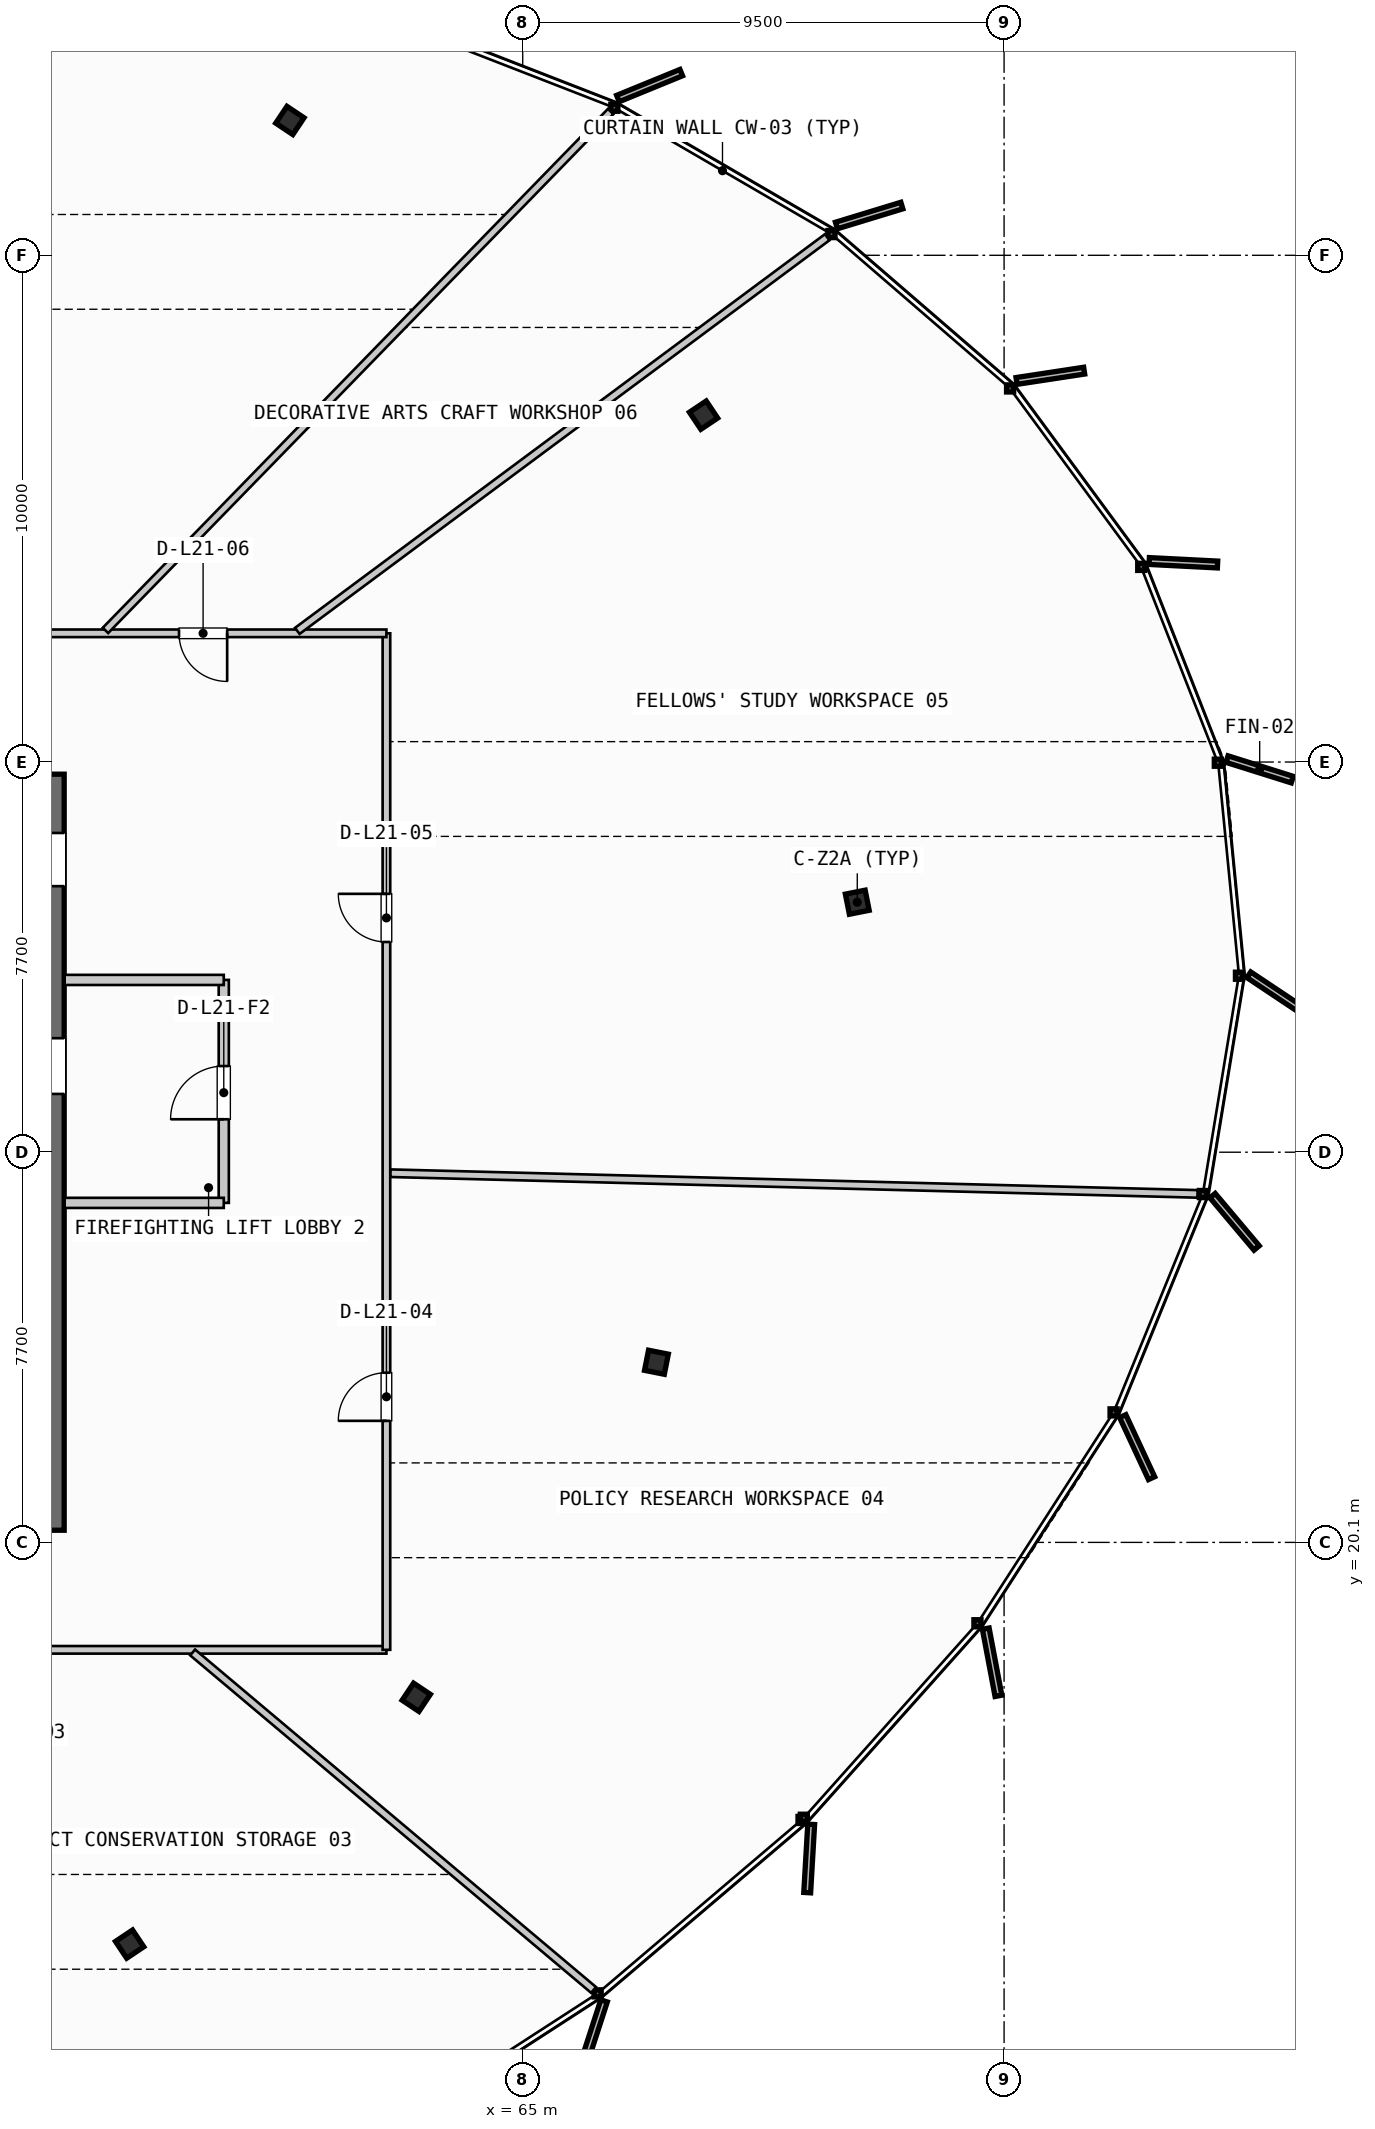
"""IFC4 building model, lengths in metres.
Left out: names, types, materials, properties, quantities, classifications, styles, units other than length and angle.
Written with IfcOpenShell. Run it as: python <this file> out.ifc"""

import sys

from ifc_helpers import new_model, si_unit, direction, frame, frame_2d, origin, origin_2d, place, context, subcontext, project, spatial, rectangle, i_section, extrude, source, transform, mapped, element, fill, save


model = new_model("IFC4")
c1 = context("Model", 3, precision=1e-05, world=origin(), true_north=direction((0.0, 1.0)))
c2 = subcontext(c1, "Body", "Model", "MODEL_VIEW")
j1 = project(units=[si_unit("LENGTHUNIT", "METRE"), si_unit("PLANEANGLEUNIT", "RADIAN")], contexts=[c1])
p1 = place(None, origin())
s1 = spatial("IfcSite", under=j1, at=p1, CompositionType="ELEMENT")
p2 = place(p1, origin())
s2 = spatial("IfcBuilding", under=s1, at=p2, CompositionType="ELEMENT")
p3 = place(p2, frame((0.0, 0.0, 89.2)))
s3 = spatial("IfcBuildingStorey", under=s2, at=p3, CompositionType="ELEMENT", Elevation=89.2)
p4 = place(p3, frame((55.6, 20.34, 0.0), z_axis=(0.0, 0.0, 1.0), x_axis=(0.0, 1.0, 0.0)))
e1 = element("IfcWall", 1, at=p4, inside=s3, PredefinedType="SHEAR", context=c2, shape_type="SweptSolid", body=[
    extrude(rectangle(XDim=14.92, YDim=0.7, at=frame_2d((7.46, 0.0))), origin(), (0.0, 0.0, 1.0), 3.35),
])
p5 = place(p4, frame((12.71, 0.0, 0.0)))
e2 = element("IfcOpeningElement", 2, at=p5, cuts=e1, PredefinedType="OPENING", context=c2, shape_type="SweptSolid", body=[
    extrude(rectangle(XDim=1.05, YDim=2.15, at=frame_2d((0.525, 1.075))), frame((0.0, 0.36, 0.0), z_axis=(0.0, -1.0, 0.0), x_axis=(1.0, 0.0, 0.0)), (0.0, 0.0, 1.0), 0.72),
])
p6 = place(p4, frame((8.61, 0.0, 0.0)))
e3 = element("IfcOpeningElement", 3, at=p6, cuts=e1, PredefinedType="OPENING", context=c2, shape_type="SweptSolid", body=[
    extrude(rectangle(XDim=1.1, YDim=2.2, at=frame_2d((0.55, 1.1))), frame((0.0, 0.36, 0.0), z_axis=(0.0, -1.0, 0.0), x_axis=(1.0, 0.0, 0.0)), (0.0, 0.0, 1.0), 0.72),
])
m1 = source(origin(), c2, "Body", "SweptSolid", [
    extrude(i_section(OverallWidth=0.405, OverallDepth=0.398, WebThickness=0.035, FlangeThickness=0.056, FilletRadius=0.015, at=origin_2d()), origin(), (0.0, 0.0, 1.0), 3.35),
])
for number, where, z_axis, x_axis in (
    (4, (71.603, 32.733, 0.0), (0.0, 0.0, 1.0), (0.981, 0.195, 0.0)),
    (5, (68.569, 42.345, 0.0), (0.0, 0.0, 1.0), (0.831, 0.556, 0.0)),
    (6, (60.405, 48.161, 0.0), (0.0, 0.0, 1.0), (0.556, 0.831, 0.0)),
    (7, (57.242, 12.172, 0.0), (0.0, 0.0, 1.0), (0.556, -0.831, 0.0)),
    (8, (62.899, 17.043, 0.0), (0.0, 0.0, 1.0), (0.831, -0.556, 0.0)),
    (9, (67.639, 23.655, 0.0), (0.0, 0.0, 1.0), (0.981, -0.195, 0.0)),
):
    element("IfcColumn", number, at=place(p3, frame(where, z_axis=z_axis, x_axis=x_axis)), inside=s3, PredefinedType="COLUMN", context=c2, shape_type="MappedRepresentation", body=[
        mapped(m1, transform((0.0, 0.0, 0.0), scale=1.0)),
    ])
p7 = place(p3, frame((59.1, 26.8, 0.0), z_axis=(0.0, 0.0, 1.0), x_axis=(0.0, 1.0, 0.0)))
e10 = element("IfcWall", 10, at=p7, inside=s3, PredefinedType="PARTITIONING", context=c2, shape_type="SweptSolid", body=[
    extrude(rectangle(XDim=4.4, YDim=0.2, at=frame_2d((2.2, 0.0))), origin(), (0.0, 0.0, 1.0), 2.28),
])
p8 = place(p7, frame((1.65, 0.0, 0.0)))
e11 = element("IfcOpeningElement", 11, at=p8, cuts=e10, PredefinedType="OPENING", context=c2, shape_type="SweptSolid", body=[
    extrude(rectangle(XDim=1.05, YDim=2.15, at=frame_2d((0.525, 1.075))), frame((0.0, 0.11, 0.0), z_axis=(0.0, -1.0, 0.0), x_axis=(1.0, 0.0, 0.0)), (0.0, 0.0, 1.0), 0.22),
])
for number, where, z_axis, x_axis in (
    (12, (55.96, 26.8, 0.0), (0.0, 0.0, 1.0), (1.0, 0.0, 0.0)),
    (13, (55.96, 31.2, 0.0), (0.0, 0.0, 1.0), (1.0, 0.0, 0.0)),
):
    element("IfcWall", number, at=place(p3, frame(where, z_axis=z_axis, x_axis=x_axis)), inside=s3, PredefinedType="PARTITIONING", context=c2, shape_type="SweptSolid", body=[
        extrude(rectangle(XDim=3.14, YDim=0.2, at=frame_2d((1.57, 0.0))), origin(), (0.0, 0.0, 1.0), 2.28),
    ])
p9 = place(p3, frame((30.77, 17.98, 0.0), z_axis=(0.0, 0.0, 1.0), x_axis=(1.0, 0.0, 0.0)))
e14 = element("IfcWall", 14, at=p9, inside=s3, PredefinedType="PARTITIONING", context=c2, shape_type="SweptSolid", body=[
    extrude(rectangle(XDim=31.54, YDim=0.15, at=frame_2d((15.77, 0.0))), origin(), (0.0, 0.0, 1.0), 2.28),
])
p10 = place(p9, frame((5.88, 0.0, 0.0)))
e15 = element("IfcOpeningElement", 15, at=p10, cuts=e14, PredefinedType="OPENING", context=c2, shape_type="SweptSolid", body=[
    extrude(rectangle(XDim=0.95, YDim=2.15, at=frame_2d((0.475, 1.075))), frame((0.0, 0.085, 0.0), z_axis=(0.0, -1.0, 0.0), x_axis=(1.0, 0.0, 0.0)), (0.0, 0.0, 1.0), 0.17),
])
p11 = place(p9, frame((15.978, 0.0, 0.0)))
e16 = element("IfcOpeningElement", 16, at=p11, cuts=e14, PredefinedType="OPENING", context=c2, shape_type="SweptSolid", body=[
    extrude(rectangle(XDim=0.95, YDim=2.15, at=frame_2d((0.475, 1.075))), frame((0.0, 0.085, 0.0), z_axis=(0.0, -1.0, 0.0), x_axis=(1.0, 0.0, 0.0)), (0.0, 0.0, 1.0), 0.17),
])
p12 = place(p9, frame((23.812, 0.0, 0.0)))
e17 = element("IfcOpeningElement", 17, at=p12, cuts=e14, PredefinedType="OPENING", context=c2, shape_type="SweptSolid", body=[
    extrude(rectangle(XDim=0.95, YDim=2.15, at=frame_2d((0.475, 1.075))), frame((0.0, 0.085, 0.0), z_axis=(0.0, -1.0, 0.0), x_axis=(1.0, 0.0, 0.0)), (0.0, 0.0, 1.0), 0.17),
])
p13 = place(p3, frame((62.31, 17.98, 0.0), z_axis=(0.0, 0.0, 1.0), x_axis=(0.0, 1.0, 0.0)))
e18 = element("IfcWall", 18, at=p13, inside=s3, PredefinedType="PARTITIONING", context=c2, shape_type="SweptSolid", body=[
    extrude(rectangle(XDim=20.06, YDim=0.15, at=frame_2d((10.03, 0.0))), origin(), (0.0, 0.0, 1.0), 2.28),
])
p14 = place(p13, frame((4.519, 0.0, 0.0)))
e19 = element("IfcOpeningElement", 19, at=p14, cuts=e18, PredefinedType="OPENING", context=c2, shape_type="SweptSolid", body=[
    extrude(rectangle(XDim=0.95, YDim=2.15, at=frame_2d((0.475, 1.075))), frame((0.0, 0.085, 0.0), z_axis=(0.0, -1.0, 0.0), x_axis=(1.0, 0.0, 0.0)), (0.0, 0.0, 1.0), 0.17),
])
p15 = place(p13, frame((13.969, 0.0, 0.0)))
e20 = element("IfcOpeningElement", 20, at=p15, cuts=e18, PredefinedType="OPENING", context=c2, shape_type="SweptSolid", body=[
    extrude(rectangle(XDim=0.95, YDim=2.15, at=frame_2d((0.475, 1.075))), frame((0.0, 0.085, 0.0), z_axis=(0.0, -1.0, 0.0), x_axis=(1.0, 0.0, 0.0)), (0.0, 0.0, 1.0), 0.17),
])
p16 = place(p3, frame((62.31, 38.04, 0.0), z_axis=(0.0, 0.0, 1.0), x_axis=(-1.0, 0.0, 0.0)))
e21 = element("IfcWall", 21, at=p16, inside=s3, PredefinedType="PARTITIONING", context=c2, shape_type="SweptSolid", body=[
    extrude(rectangle(XDim=31.54, YDim=0.15, at=frame_2d((15.77, 0.0))), origin(), (0.0, 0.0, 1.0), 2.28),
])
p17 = place(p16, frame((3.143, 0.0, 0.0)))
e22 = element("IfcOpeningElement", 22, at=p17, cuts=e21, PredefinedType="OPENING", context=c2, shape_type="SweptSolid", body=[
    extrude(rectangle(XDim=0.95, YDim=2.15, at=frame_2d((0.475, 1.075))), frame((0.0, 0.085, 0.0), z_axis=(0.0, -1.0, 0.0), x_axis=(1.0, 0.0, 0.0)), (0.0, 0.0, 1.0), 0.17),
])
p18 = place(p16, frame((12.512, 0.0, 0.0)))
e23 = element("IfcOpeningElement", 23, at=p18, cuts=e21, PredefinedType="OPENING", context=c2, shape_type="SweptSolid", body=[
    extrude(rectangle(XDim=0.95, YDim=2.15, at=frame_2d((0.475, 1.075))), frame((0.0, 0.085, 0.0), z_axis=(0.0, -1.0, 0.0), x_axis=(1.0, 0.0, 0.0)), (0.0, 0.0, 1.0), 0.17),
])
p19 = place(p16, frame((25.231, 0.0, 0.0)))
e24 = element("IfcOpeningElement", 24, at=p19, cuts=e21, PredefinedType="OPENING", context=c2, shape_type="SweptSolid", body=[
    extrude(rectangle(XDim=0.95, YDim=2.15, at=frame_2d((0.475, 1.075))), frame((0.0, 0.085, 0.0), z_axis=(0.0, -1.0, 0.0), x_axis=(1.0, 0.0, 0.0)), (0.0, 0.0, 1.0), 0.17),
])
p20 = place(p3, frame((51.57, 17.908, 0.0), z_axis=(0.0, 0.0, 1.0), x_axis=(0.434373756615, -0.900732723711, 0.0)))
e25 = element("IfcWall", 25, at=p20, inside=s3, PredefinedType="PARTITIONING", context=c2, shape_type="SweptSolid", body=[
    extrude(rectangle(XDim=13.045, YDim=0.15, at=frame_2d((6.522, 0.0))), origin(), (0.0, 0.0, 1.0), 2.28),
])
p21 = place(p3, frame((58.485, 17.928, 0.0), z_axis=(0.0, 0.0, 1.0), x_axis=(0.765056250886, -0.643963456247, 0.0)))
e26 = element("IfcWall", 26, at=p21, inside=s3, PredefinedType="PARTITIONING", context=c2, shape_type="SweptSolid", body=[
    extrude(rectangle(XDim=10.343, YDim=0.15, at=frame_2d((5.171, 0.0))), origin(), (0.0, 0.0, 1.0), 2.28),
])
p22 = place(p3, frame((62.39, 27.385, 0.0), z_axis=(0.0, 0.0, 1.0), x_axis=(0.999671742938, -0.025620428796, 0.0)))
e27 = element("IfcWall", 27, at=p22, inside=s3, PredefinedType="PARTITIONING", context=c2, shape_type="SweptSolid", body=[
    extrude(rectangle(XDim=15.933, YDim=0.15, at=frame_2d((7.966, 0.0))), origin(), (0.0, 0.0, 1.0), 2.28),
])
p23 = place(p3, frame((60.551, 38.088, 0.0), z_axis=(0.0, 0.0, 1.0), x_axis=(0.802739746864, 0.596329521997, 0.0)))
e28 = element("IfcWall", 28, at=p23, inside=s3, PredefinedType="PARTITIONING", context=c2, shape_type="SweptSolid", body=[
    extrude(rectangle(XDim=13.027, YDim=0.15, at=frame_2d((6.514, 0.0))), origin(), (0.0, 0.0, 1.0), 2.28),
])
p24 = place(p3, frame((56.765, 38.097, 0.0), z_axis=(0.0, 0.0, 1.0), x_axis=(0.697622683168, 0.716465345938, 0.0)))
e29 = element("IfcWall", 29, at=p24, inside=s3, PredefinedType="PARTITIONING", context=c2, shape_type="SweptSolid", body=[
    extrude(rectangle(XDim=14.291, YDim=0.15, at=frame_2d((7.146, 0.0))), origin(), (0.0, 0.0, 1.0), 2.28),
])
m2 = source(origin(), c2, "Body", "SweptSolid", [
    extrude(rectangle(XDim=1.05, YDim=2.15, at=frame_2d((0.525, 1.075))), frame((0.0, 0.025, 0.0), z_axis=(0.0, -1.0, 0.0), x_axis=(1.0, 0.0, 0.0)), (0.0, 0.0, 1.0), 0.05),
])
p25 = place(p8, origin())
e30 = element("IfcDoor", 30, at=p25, inside=s3, OperationType="SINGLE_SWING_LEFT", PredefinedType="DOOR", context=c2, shape_type="MappedRepresentation", body=[
    mapped(m2, transform((0.0, 0.0, 0.0), scale=1.0)),
])
fill(e11, e30)
m3 = source(origin(), c2, "Body", "SweptSolid", [
    extrude(rectangle(XDim=0.95, YDim=2.15, at=frame_2d((0.475, 1.075))), frame((0.0, 0.025, 0.0), z_axis=(0.0, -1.0, 0.0), x_axis=(1.0, 0.0, 0.0)), (0.0, 0.0, 1.0), 0.05),
])
p26 = place(p14, origin())
e31 = element("IfcDoor", 31, at=p26, inside=s3, OperationType="SINGLE_SWING_LEFT", PredefinedType="DOOR", context=c2, shape_type="MappedRepresentation", body=[
    mapped(m3, transform((0.0, 0.0, 0.0), scale=1.0)),
])
fill(e19, e31)
p27 = place(p15, origin())
e32 = element("IfcDoor", 32, at=p27, inside=s3, OperationType="SINGLE_SWING_RIGHT", PredefinedType="DOOR", context=c2, shape_type="MappedRepresentation", body=[
    mapped(m3, transform((0.0, 0.0, 0.0), scale=1.0)),
])
fill(e20, e32)
p28 = place(p17, origin())
e33 = element("IfcDoor", 33, at=p28, inside=s3, OperationType="SINGLE_SWING_LEFT", PredefinedType="DOOR", context=c2, shape_type="MappedRepresentation", body=[
    mapped(m3, transform((0.0, 0.0, 0.0), scale=1.0)),
])
fill(e22, e33)
save(model, sys.argv[1])
